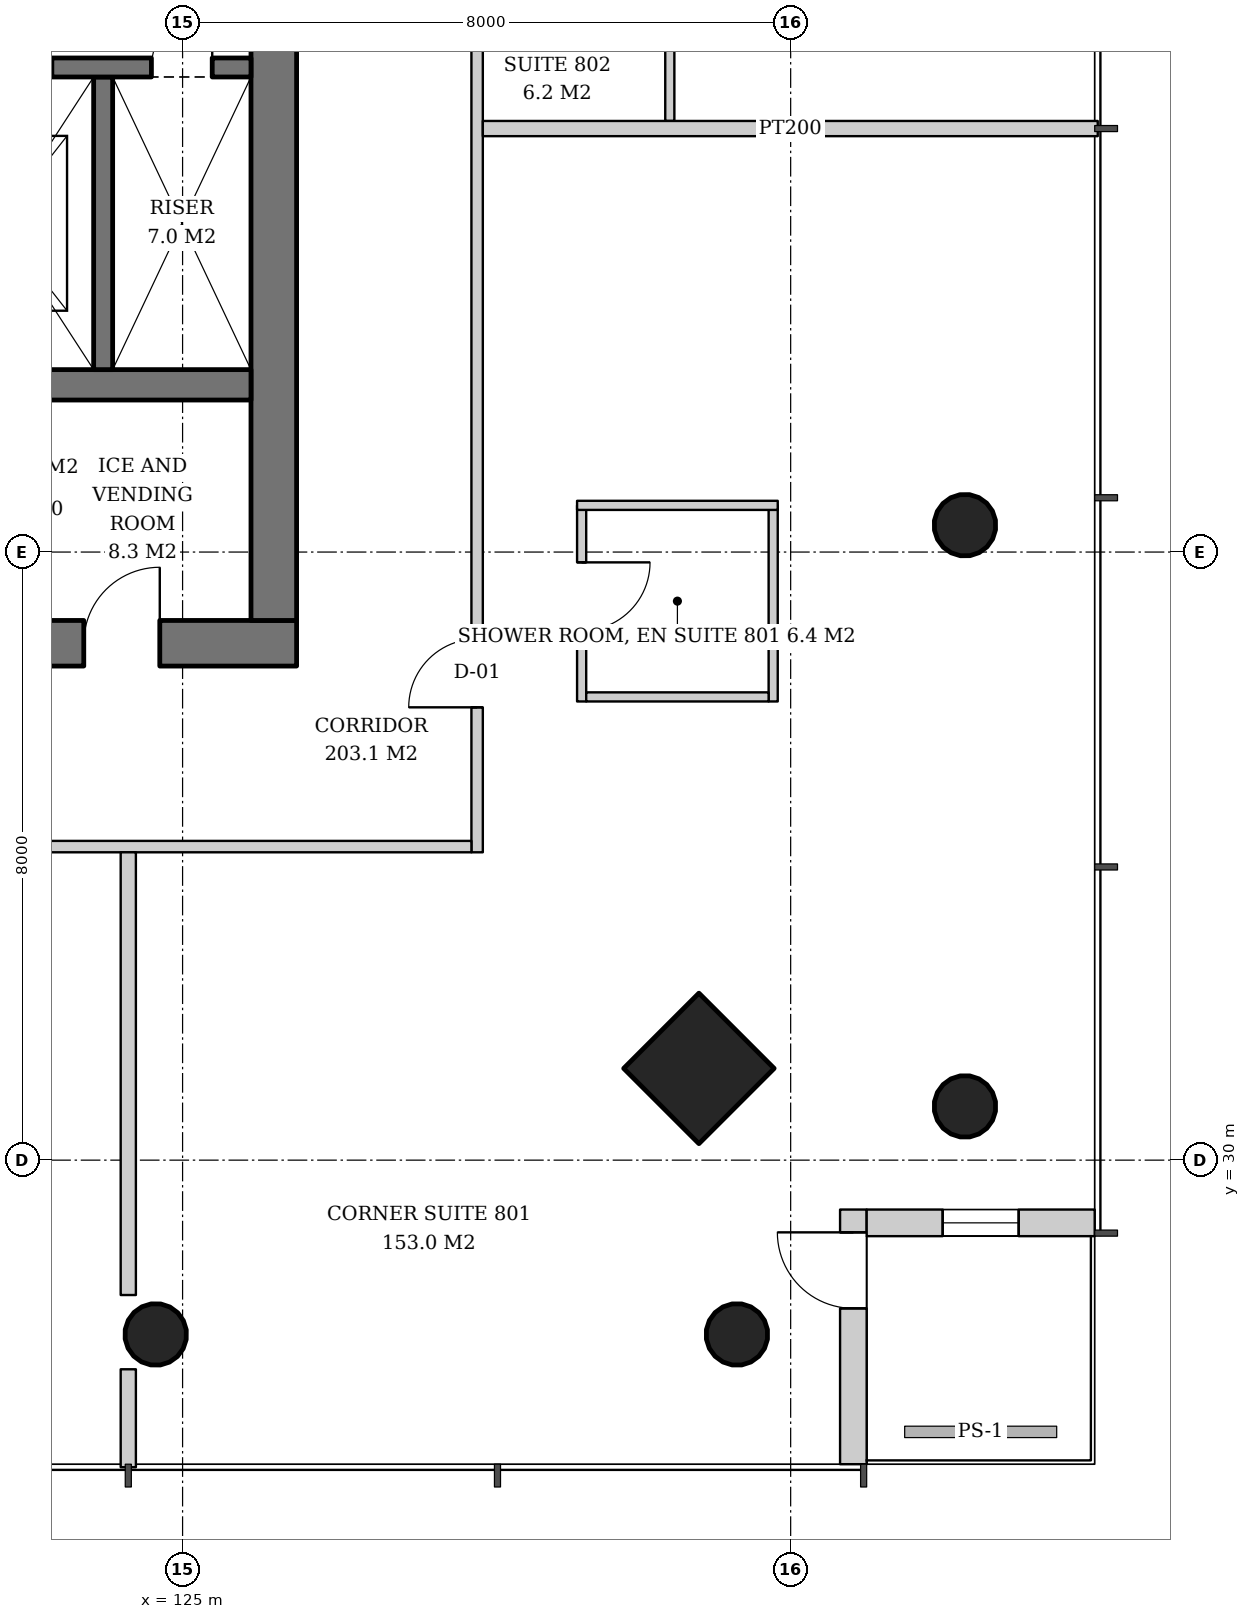
"""IFC4 building model, lengths in metres.
Left out: names, types, materials, properties, quantities, classifications, styles, units other than length and angle.
Written with IfcOpenShell. Run it as: python <this file> out.ifc"""

import sys

from ifc_helpers import new_model, si_unit, direction, frame, frame_2d, origin, origin_2d, place, context, subcontext, project, spatial, rectangle, hollow_circle, extrude, element, fill, save


model = new_model("IFC4")
c1 = context("Model", 3, precision=1e-05, world=origin(), true_north=direction((0.0, 1.0)))
c2 = subcontext(c1, "Body", "Model", "MODEL_VIEW")
j1 = project(units=[si_unit("LENGTHUNIT", "METRE"), si_unit("PLANEANGLEUNIT", "RADIAN")], contexts=[c1])
p1 = place(None, origin())
s1 = spatial("IfcSite", under=j1, at=p1, CompositionType="ELEMENT")
p2 = place(p1, origin())
s2 = spatial("IfcBuilding", under=s1, at=p2, CompositionType="ELEMENT")
p3 = place(p2, frame((0.0, 0.0, 36.2)))
s3 = spatial("IfcBuildingStorey", under=s2, at=p3, CompositionType="ELEMENT", Elevation=36.2)
p4 = place(p3, frame((135.345, 30.655, 0.0), z_axis=(-0.042965756413, 0.042965756413, 0.998152236661), x_axis=(-0.707106781187, -0.707106781187, 0.0)))
e1 = element("IfcColumn", 1, at=p4, inside=s3, PredefinedType="COLUMN", context=c2, shape_type="SweptSolid", body=[
    extrude(hollow_circle(Radius=0.406, WallThickness=0.03, at=origin_2d()), origin(), (0.0, 0.0, 1.0), 3.807),
])
p5 = place(p3, frame((135.345, 38.328, 0.0), z_axis=(-0.042995531285, 0.021497765643, 0.998843946952), x_axis=(-0.4472135955, -0.894427191, 0.0)))
e2 = element("IfcColumn", 2, at=p5, inside=s3, PredefinedType="COLUMN", context=c2, shape_type="SweptSolid", body=[
    extrude(hollow_circle(Radius=0.406, WallThickness=0.03, at=origin_2d()), origin(), (0.0, 0.0, 1.0), 3.804),
])
p6 = place(p3, frame((131.845, 31.155, 0.0), z_axis=(-0.042965756413, 0.042965756413, 0.998152236661), x_axis=(-0.707106781187, -0.707106781187, 0.0)))
e3 = element("IfcColumn", 3, at=p6, inside=s3, PredefinedType="COLUMN", context=c2, shape_type="SweptSolid", body=[
    extrude(rectangle(XDim=1.4, YDim=1.4, at=origin_2d()), origin(), (0.0, 0.0, 1.0), 3.807),
])
p7 = place(p3, frame((132.345, 27.655, 0.0), z_axis=(-0.042965756413, 0.042965756413, 0.998152236661), x_axis=(-0.707106781187, -0.707106781187, 0.0)))
e4 = element("IfcColumn", 4, at=p7, inside=s3, PredefinedType="COLUMN", context=c2, shape_type="SweptSolid", body=[
    extrude(hollow_circle(Radius=0.406, WallThickness=0.03, at=origin_2d()), origin(), (0.0, 0.0, 1.0), 3.807),
])
p8 = place(p3, frame((124.672, 27.655, 0.0), z_axis=(-0.021497765643, 0.042995531285, 0.998843946952), x_axis=(-0.894427191, -0.4472135955, 0.0)))
e5 = element("IfcColumn", 5, at=p8, inside=s3, PredefinedType="COLUMN", context=c2, shape_type="SweptSolid", body=[
    extrude(hollow_circle(Radius=0.406, WallThickness=0.03, at=origin_2d()), origin(), (0.0, 0.0, 1.0), 3.804),
])
p9 = place(p3, frame((107.5, 36.8, 0.0), z_axis=(0.0, 0.0, 1.0), x_axis=(1.0, 0.0, 0.0)))
e6 = element("IfcWall", 6, at=p9, inside=s3, PredefinedType="SHEAR", context=c2, shape_type="SweptSolid", body=[
    extrude(rectangle(XDim=19.0, YDim=0.6, at=frame_2d((9.5, 0.0))), origin(), (0.0, 0.0, 1.0), 3.8),
])
p10 = place(p9, frame((3.9, 0.0, 0.0)))
e7 = element("IfcOpeningElement", 7, at=p10, cuts=e6, PredefinedType="OPENING", context=c2, shape_type="SweptSolid", body=[
    extrude(rectangle(XDim=1.0, YDim=2.1, at=frame_2d((0.5, 1.05))), frame((0.0, 0.31, 0.0), z_axis=(0.0, -1.0, 0.0), x_axis=(1.0, 0.0, 0.0)), (0.0, 0.0, 1.0), 0.62),
])
p11 = place(p9, frame((14.153, 0.0, 0.0)))
e8 = element("IfcOpeningElement", 8, at=p11, cuts=e6, PredefinedType="OPENING", context=c2, shape_type="SweptSolid", body=[
    extrude(rectangle(XDim=1.0, YDim=2.1, at=frame_2d((0.5, 1.05))), frame((0.0, 0.31, 0.0), z_axis=(0.0, -1.0, 0.0), x_axis=(1.0, 0.0, 0.0)), (0.0, 0.0, 1.0), 0.62),
])
p12 = place(p9, frame((16.2, 0.0, 0.0)))
e9 = element("IfcOpeningElement", 9, at=p12, cuts=e6, PredefinedType="OPENING", context=c2, shape_type="SweptSolid", body=[
    extrude(rectangle(XDim=1.0, YDim=2.1, at=frame_2d((0.5, 1.05))), frame((0.0, 0.31, 0.0), z_axis=(0.0, -1.0, 0.0), x_axis=(1.0, 0.0, 0.0)), (0.0, 0.0, 1.0), 0.62),
])
p13 = place(p3, frame((126.2, 37.1, 0.0), z_axis=(0.0, 0.0, 1.0), x_axis=(0.0, 1.0, 0.0)))
e10 = element("IfcWall", 10, at=p13, inside=s3, PredefinedType="SHEAR", context=c2, shape_type="SweptSolid", body=[
    extrude(rectangle(XDim=17.8, YDim=0.6, at=frame_2d((8.9, 0.0))), origin(), (0.0, 0.0, 1.0), 3.8),
])
p14 = place(p13, frame((8.0, 0.0, 0.0)))
e11 = element("IfcOpeningElement", 11, at=p14, cuts=e10, PredefinedType="OPENING", context=c2, shape_type="SweptSolid", body=[
    extrude(rectangle(XDim=1.8, YDim=2.4, at=frame_2d((0.9, 1.2))), frame((0.0, 0.31, 0.0), z_axis=(0.0, -1.0, 0.0), x_axis=(1.0, 0.0, 0.0)), (0.0, 0.0, 1.0), 0.62),
])
p15 = place(p3, frame((108.1, 40.2, 0.0), z_axis=(0.0, 0.0, 1.0), x_axis=(1.0, 0.0, 0.0)))
e12 = element("IfcWall", 12, at=p15, inside=s3, PredefinedType="SHEAR", context=c2, shape_type="SweptSolid", body=[
    extrude(rectangle(XDim=17.8, YDim=0.4, at=frame_2d((8.9, 0.0))), origin(), (0.0, 0.0, 1.0), 3.8),
])
p16 = place(p3, frame((133.825, 26.0, 0.0), z_axis=(0.0, 0.0, 1.0), x_axis=(0.0, 1.0, 0.0)))
e13 = element("IfcWall", 13, at=p16, inside=s3, PredefinedType="SOLIDWALL", context=c2, shape_type="SweptSolid", body=[
    extrude(rectangle(XDim=3.35, YDim=0.35, at=frame_2d((1.675, 0.0))), origin(), (0.0, 0.0, 1.0), 3.6),
])
p17 = place(p16, frame((2.05, 0.0, 0.0)))
e14 = element("IfcOpeningElement", 14, at=p17, cuts=e13, PredefinedType="OPENING", context=c2, shape_type="SweptSolid", body=[
    extrude(rectangle(XDim=1.0, YDim=2.4, at=frame_2d((0.5, 1.2))), frame((0.0, 0.185, 0.0), z_axis=(0.0, -1.0, 0.0), x_axis=(1.0, 0.0, 0.0)), (0.0, 0.0, 1.0), 0.37),
])
p18 = place(p3, frame((134.0, 29.175, 0.0), z_axis=(0.0, 0.0, 1.0), x_axis=(1.0, 0.0, 0.0)))
e15 = element("IfcWall", 15, at=p18, inside=s3, PredefinedType="SOLIDWALL", context=c2, shape_type="SweptSolid", body=[
    extrude(rectangle(XDim=3.0, YDim=0.35, at=frame_2d((1.5, 0.0))), origin(), (0.0, 0.0, 1.0), 3.6),
])
p19 = place(p18, frame((1.0, 0.0, 0.9)))
e16 = element("IfcOpeningElement", 16, at=p19, cuts=e15, PredefinedType="OPENING", context=c2, shape_type="SweptSolid", body=[
    extrude(rectangle(XDim=1.0, YDim=2.4, at=frame_2d((0.5, 1.2))), frame((0.0, 0.185, 0.0), z_axis=(0.0, -1.0, 0.0), x_axis=(1.0, 0.0, 0.0)), (0.0, 0.0, 1.0), 0.37),
])
p20 = place(p3, frame((123.955, 44.25, 0.0), z_axis=(0.0, 0.0, 1.0), x_axis=(0.0, -1.0, 0.0)))
e17 = element("IfcWall", 17, at=p20, inside=s3, PredefinedType="SHEAR", context=c2, shape_type="SweptSolid", body=[
    extrude(rectangle(XDim=3.85, YDim=0.25, at=frame_2d((1.925, 0.0))), origin(), (0.0, 0.0, 1.0), 3.8),
])
p21 = place(p3, frame((121.33, 44.375, 0.0), z_axis=(0.0, 0.0, 1.0), x_axis=(1.0, 0.0, 0.0)))
e18 = element("IfcWall", 18, at=p21, inside=s3, PredefinedType="SHEAR", context=c2, shape_type="SweptSolid", body=[
    extrude(rectangle(XDim=4.57, YDim=0.25, at=frame_2d((2.285, 0.0))), origin(), (0.0, 0.0, 1.0), 3.8),
])
p22 = place(p21, frame((0.55, 0.0, 0.0)))
e19 = element("IfcOpeningElement", 19, at=p22, cuts=e18, PredefinedType="OPENING", context=c2, shape_type="SweptSolid", body=[
    extrude(rectangle(XDim=1.4, YDim=2.4, at=frame_2d((0.7, 1.2))), frame((0.0, 0.135, 0.0), z_axis=(0.0, -1.0, 0.0), x_axis=(1.0, 0.0, 0.0)), (0.0, 0.0, 1.0), 0.27),
])
p23 = place(p21, frame((3.26, 0.0, 0.0)))
e20 = element("IfcOpeningElement", 20, at=p23, cuts=e18, PredefinedType="OPENING", context=c2, shape_type="SweptSolid", body=[
    extrude(rectangle(XDim=0.8, YDim=2.0, at=frame_2d((0.4, 1.0))), frame((0.0, 0.135, 0.0), z_axis=(0.0, -1.0, 0.0), x_axis=(1.0, 0.0, 0.0)), (0.0, 0.0, 1.0), 0.27),
])
p24 = place(p3, frame((130.25, 38.614, 0.0), z_axis=(0.0, 0.0, 1.0), x_axis=(0.0, -1.0, 0.0)))
e21 = element("IfcWall", 21, at=p24, inside=s3, PredefinedType="PARTITIONING", context=c2, shape_type="SweptSolid", body=[
    extrude(rectangle(XDim=2.58, YDim=0.12, at=frame_2d((1.29, 0.0))), origin(), (0.0, 0.0, 1.0), 2.8),
])
p25 = place(p24, frame((0.75, 0.0, 0.0)))
e22 = element("IfcOpeningElement", 22, at=p25, cuts=e21, PredefinedType="OPENING", context=c2, shape_type="SweptSolid", body=[
    extrude(rectangle(XDim=0.9, YDim=2.1, at=frame_2d((0.45, 1.05))), frame((0.0, 0.07, 0.0), z_axis=(0.0, -1.0, 0.0), x_axis=(1.0, 0.0, 0.0)), (0.0, 0.0, 1.0), 0.14),
])
p26 = place(p3, frame((132.77, 38.614, 0.0), z_axis=(0.0, 0.0, 1.0), x_axis=(0.0, -1.0, 0.0)))
e23 = element("IfcWall", 23, at=p26, inside=s3, PredefinedType="PARTITIONING", context=c2, shape_type="SweptSolid", body=[
    extrude(rectangle(XDim=2.58, YDim=0.12, at=frame_2d((1.29, 0.0))), origin(), (0.0, 0.0, 1.0), 2.8),
])
p27 = place(p3, frame((130.31, 36.094, 0.0), z_axis=(0.0, 0.0, 1.0), x_axis=(1.0, 0.0, 0.0)))
e24 = element("IfcWall", 24, at=p27, inside=s3, PredefinedType="PARTITIONING", context=c2, shape_type="SweptSolid", body=[
    extrude(rectangle(XDim=2.4, YDim=0.12, at=frame_2d((1.2, 0.0))), origin(), (0.0, 0.0, 1.0), 2.847),
])
p28 = place(p3, frame((130.19, 38.614, 0.0), z_axis=(0.0, 0.0, 1.0), x_axis=(1.0, 0.0, 0.0)))
e25 = element("IfcWall", 25, at=p28, inside=s3, PredefinedType="PARTITIONING", context=c2, shape_type="SweptSolid", body=[
    extrude(rectangle(XDim=2.64, YDim=0.12, at=frame_2d((1.32, 0.0))), origin(), (0.0, 0.0, 1.0), 3.6),
])
p29 = place(p3, frame((131.41, 43.671, 0.0), z_axis=(0.0, 0.0, 1.0), x_axis=(0.0, 1.0, 0.0)))
e26 = element("IfcWall", 26, at=p29, inside=s3, PredefinedType="PARTITIONING", context=c2, shape_type="SweptSolid", body=[
    extrude(rectangle(XDim=2.42, YDim=0.12, at=frame_2d((1.21, 0.0))), origin(), (0.0, 0.0, 1.0), 2.847),
])
p30 = place(p3, frame((128.875, 34.05, 0.0), z_axis=(0.0, 0.0, 1.0), x_axis=(0.0, 1.0, 0.0)))
e27 = element("IfcWall", 27, at=p30, inside=s3, PredefinedType="PARTITIONING", context=c2, shape_type="SweptSolid", body=[
    extrude(rectangle(XDim=23.75, YDim=0.15, at=frame_2d((11.875, 0.0))), origin(), (0.0, 0.0, 1.0), 2.8),
])
p31 = place(p30, frame((1.907, 0.0, 0.0)))
e28 = element("IfcOpeningElement", 28, at=p31, cuts=e27, PredefinedType="OPENING", context=c2, shape_type="SweptSolid", body=[
    extrude(rectangle(XDim=0.9, YDim=2.1, at=frame_2d((0.45, 1.05))), frame((0.0, 0.085, 0.0), z_axis=(0.0, -1.0, 0.0), x_axis=(1.0, 0.0, 0.0)), (0.0, 0.0, 1.0), 0.17),
])
p32 = place(p30, frame((12.271, 0.0, 0.0)))
e29 = element("IfcOpeningElement", 29, at=p32, cuts=e27, PredefinedType="OPENING", context=c2, shape_type="SweptSolid", body=[
    extrude(rectangle(XDim=0.9, YDim=2.1, at=frame_2d((0.45, 1.05))), frame((0.0, 0.085, 0.0), z_axis=(0.0, -1.0, 0.0), x_axis=(1.0, 0.0, 0.0)), (0.0, 0.0, 1.0), 0.17),
])
p33 = place(p30, frame((15.586, 0.0, 0.0)))
e30 = element("IfcOpeningElement", 30, at=p33, cuts=e27, PredefinedType="OPENING", context=c2, shape_type="SweptSolid", body=[
    extrude(rectangle(XDim=0.9, YDim=2.1, at=frame_2d((0.45, 1.05))), frame((0.0, 0.085, 0.0), z_axis=(0.0, -1.0, 0.0), x_axis=(1.0, 0.0, 0.0)), (0.0, 0.0, 1.0), 0.17),
])
p34 = place(p3, frame((128.95, 43.572, 0.0), z_axis=(0.0, 0.0, 1.0), x_axis=(1.0, 0.0, 0.0)))
e31 = element("IfcWall", 31, at=p34, inside=s3, PredefinedType="PARTITIONING", context=c2, shape_type="SweptSolid", body=[
    extrude(rectangle(XDim=8.09, YDim=0.2, at=frame_2d((4.045, 0.0))), origin(), (0.0, 0.0, 1.0), 3.05),
])
p35 = place(p3, frame((105.05, 34.125, 0.0), z_axis=(0.0, 0.0, 1.0), x_axis=(1.0, 0.0, 0.0)))
e32 = element("IfcWall", 32, at=p35, inside=s3, PredefinedType="PARTITIONING", context=c2, shape_type="SweptSolid", body=[
    extrude(rectangle(XDim=23.75, YDim=0.15, at=frame_2d((11.875, 0.0))), origin(), (0.0, 0.0, 1.0), 2.8),
])
p36 = place(p35, frame((1.907, 0.0, 0.0)))
e33 = element("IfcOpeningElement", 33, at=p36, cuts=e32, PredefinedType="OPENING", context=c2, shape_type="SweptSolid", body=[
    extrude(rectangle(XDim=0.9, YDim=2.1, at=frame_2d((0.45, 1.05))), frame((0.0, 0.085, 0.0), z_axis=(0.0, -1.0, 0.0), x_axis=(1.0, 0.0, 0.0)), (0.0, 0.0, 1.0), 0.17),
])
p37 = place(p35, frame((7.414, 0.0, 0.0)))
e34 = element("IfcOpeningElement", 34, at=p37, cuts=e32, PredefinedType="OPENING", context=c2, shape_type="SweptSolid", body=[
    extrude(rectangle(XDim=0.9, YDim=2.1, at=frame_2d((0.45, 1.05))), frame((0.0, 0.085, 0.0), z_axis=(0.0, -1.0, 0.0), x_axis=(1.0, 0.0, 0.0)), (0.0, 0.0, 1.0), 0.17),
])
p38 = place(p35, frame((12.271, 0.0, 0.0)))
e35 = element("IfcOpeningElement", 35, at=p38, cuts=e32, PredefinedType="OPENING", context=c2, shape_type="SweptSolid", body=[
    extrude(rectangle(XDim=0.9, YDim=2.1, at=frame_2d((0.45, 1.05))), frame((0.0, 0.085, 0.0), z_axis=(0.0, -1.0, 0.0), x_axis=(1.0, 0.0, 0.0)), (0.0, 0.0, 1.0), 0.17),
])
p39 = place(p3, frame((124.286, 34.05, 0.0), z_axis=(0.0, 0.0, 1.0), x_axis=(0.0, -1.0, 0.0)))
e36 = element("IfcWall", 36, at=p39, inside=s3, PredefinedType="PARTITIONING", context=c2, shape_type="SweptSolid", body=[
    extrude(rectangle(XDim=5.824, YDim=0.2, at=frame_2d((2.912, 0.0))), origin(), (0.0, 0.0, 1.0), 3.6),
])
p40 = place(p3, frame((124.286, 27.249, 0.0), z_axis=(0.0, 0.0, 1.0), x_axis=(0.0, -1.0, 0.0)))
e37 = element("IfcWall", 37, at=p40, inside=s3, PredefinedType="PARTITIONING", context=c2, shape_type="SweptSolid", body=[
    extrude(rectangle(XDim=1.289, YDim=0.2, at=frame_2d((0.645, 0.0))), origin(), (0.0, 0.0, 1.0), 3.6),
])
p41 = place(p17, origin())
e38 = element("IfcDoor", 38, at=p41, inside=s3, OperationType="SINGLE_SWING_RIGHT", PredefinedType="DOOR", context=c2, shape_type="SweptSolid", body=[
    extrude(rectangle(XDim=1.0, YDim=2.4, at=frame_2d((0.5, 1.2))), frame((0.0, 0.025, 0.0), z_axis=(0.0, -1.0, 0.0), x_axis=(1.0, 0.0, 0.0)), (0.0, 0.0, 1.0), 0.05),
])
fill(e14, e38)
p42 = place(p19, origin())
e39 = element("IfcWindow", 39, at=p42, inside=s3, PartitioningType="SINGLE_PANEL", PredefinedType="WINDOW", context=c2, shape_type="SweptSolid", body=[
    extrude(rectangle(XDim=1.0, YDim=2.4, at=frame_2d((0.5, 1.2))), frame((0.0, 0.03, 0.0), z_axis=(0.0, -1.0, 0.0), x_axis=(1.0, 0.0, 0.0)), (0.0, 0.0, 1.0), 0.06),
])
fill(e16, e39)
p43 = place(p23, origin())
e40 = element("IfcDoor", 40, at=p43, inside=s3, OperationType="SINGLE_SWING_RIGHT", PredefinedType="DOOR", context=c2, shape_type="SweptSolid", body=[
    extrude(rectangle(XDim=0.8, YDim=2.0, at=frame_2d((0.4, 1.0))), frame((0.0, 0.025, 0.0), z_axis=(0.0, -1.0, 0.0), x_axis=(1.0, 0.0, 0.0)), (0.0, 0.0, 1.0), 0.05),
])
fill(e20, e40)
p44 = place(p12, origin())
e41 = element("IfcDoor", 41, at=p44, inside=s3, OperationType="SINGLE_SWING_RIGHT", PredefinedType="DOOR", context=c2, shape_type="SweptSolid", body=[
    extrude(rectangle(XDim=1.0, YDim=2.1, at=frame_2d((0.5, 1.05))), frame((0.0, 0.29, 0.0), z_axis=(0.0, -1.0, 0.0), x_axis=(1.0, 0.0, 0.0)), (0.0, 0.0, 1.0), 0.05),
])
fill(e9, e41)
p45 = place(p25, origin())
e42 = element("IfcDoor", 42, at=p45, inside=s3, OperationType="SINGLE_SWING_LEFT", PredefinedType="DOOR", context=c2, shape_type="SweptSolid", body=[
    extrude(rectangle(XDim=0.9, YDim=2.1, at=frame_2d((0.45, 1.05))), frame((0.0, 0.025, 0.0), z_axis=(0.0, -1.0, 0.0), x_axis=(1.0, 0.0, 0.0)), (0.0, 0.0, 1.0), 0.05),
])
fill(e22, e42)
p46 = place(p31, origin())
e43 = element("IfcDoor", 43, at=p46, inside=s3, OperationType="SINGLE_SWING_LEFT", PredefinedType="DOOR", context=c2, shape_type="SweptSolid", body=[
    extrude(rectangle(XDim=0.9, YDim=2.1, at=frame_2d((0.45, 1.05))), frame((0.0, 0.025, 0.0), z_axis=(0.0, -1.0, 0.0), x_axis=(1.0, 0.0, 0.0)), (0.0, 0.0, 1.0), 0.05),
])
fill(e28, e43)
save(model, sys.argv[1])
